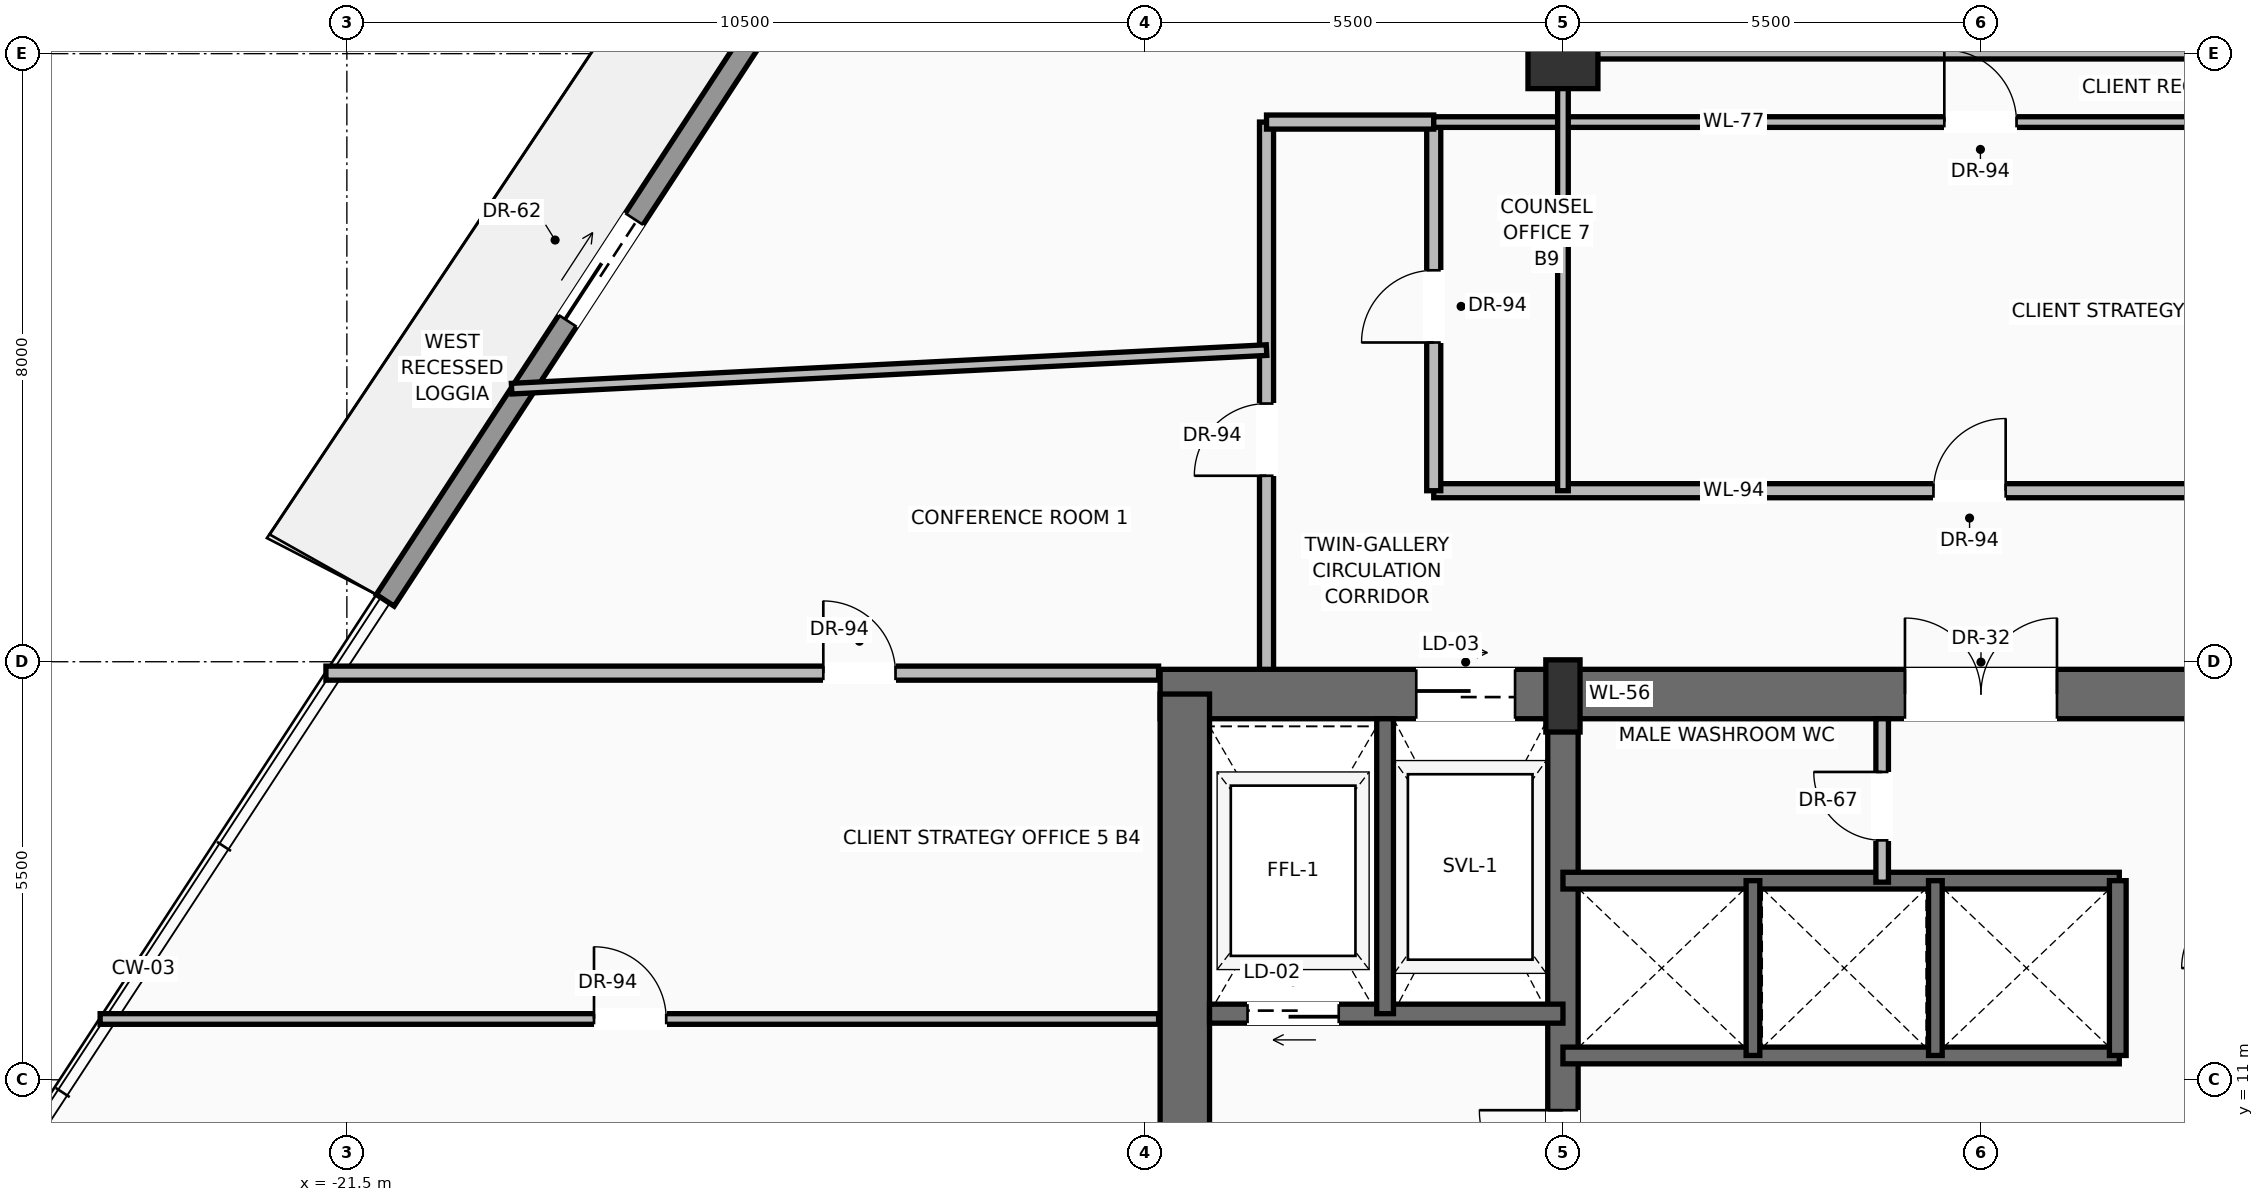
"""IFC4 building model, lengths in metres.
Left out: names, types, materials, properties, quantities, classifications, styles, units other than length and angle.
Written with IfcOpenShell. Run it as: python <this file> out.ifc"""

import sys

from ifc_helpers import new_model, si_unit, direction, frame, frame_2d, origin, origin_2d, place, context, subcontext, project, spatial, rectangle, extrude, source, transform, mapped, element, fill, save


model = new_model("IFC4")
c1 = context("Model", 3, precision=1e-05, world=origin(), true_north=direction((0.0, 1.0)))
c2 = subcontext(c1, "Body", "Model", "MODEL_VIEW")
j1 = project(units=[si_unit("LENGTHUNIT", "METRE"), si_unit("PLANEANGLEUNIT", "RADIAN")], contexts=[c1])
p1 = place(None, origin())
s1 = spatial("IfcSite", under=j1, at=p1, CompositionType="ELEMENT")
p2 = place(p1, origin())
s2 = spatial("IfcBuilding", under=s1, at=p2, CompositionType="ELEMENT")
p3 = place(p2, frame((0.0, 0.0, 136.7)))
s3 = spatial("IfcBuildingStorey", under=s2, at=p3, CompositionType="ELEMENT", Elevation=136.7)
p4 = place(p3, frame((-10.8, 16.075, 0.0), z_axis=(0.0, 0.0, 1.0), x_axis=(1.0, 0.0, 0.0)))
e1 = element("IfcWall", 1, at=p4, inside=s3, PredefinedType="SHEAR", context=c2, shape_type="SweptSolid", body=[
    extrude(rectangle(XDim=21.6, YDim=0.65, at=frame_2d((10.8, 0.0))), origin(), (0.0, 0.0, 1.0), 3.47),
])
p5 = place(p4, frame((3.37, 0.0, 0.0)))
e2 = element("IfcOpeningElement", 2, at=p5, cuts=e1, PredefinedType="OPENING", context=c2, shape_type="SweptSolid", body=[
    extrude(rectangle(XDim=1.3, YDim=2.3, at=frame_2d((0.65, 1.15))), frame((0.0, 0.335, 0.0), z_axis=(0.0, -1.0, 0.0), x_axis=(1.0, 0.0, 0.0)), (0.0, 0.0, 1.0), 0.67),
])
p6 = place(p4, frame((9.8, 0.0, 0.0)))
e3 = element("IfcOpeningElement", 3, at=p6, cuts=e1, PredefinedType="OPENING", context=c2, shape_type="SweptSolid", body=[
    extrude(rectangle(XDim=2.0, YDim=2.4, at=frame_2d((1.0, 1.2))), frame((0.0, 0.335, 0.0), z_axis=(0.0, -1.0, 0.0), x_axis=(1.0, 0.0, 0.0)), (0.0, 0.0, 1.0), 0.67),
])
p7 = place(p3, frame((-10.475, 0.525, 0.0), z_axis=(0.0, 0.0, 1.0), x_axis=(0.0, 1.0, 0.0)))
e4 = element("IfcWall", 4, at=p7, inside=s3, PredefinedType="SHEAR", context=c2, shape_type="SweptSolid", body=[
    extrude(rectangle(XDim=15.55, YDim=0.65, at=frame_2d((7.775, 0.0))), origin(), (0.0, 0.0, 1.0), 3.47),
])
p8 = place(p3, frame((-5.5, 0.525, 0.0), z_axis=(0.0, 0.0, 1.0), x_axis=(0.0, 1.0, 0.0)))
e5 = element("IfcWall", 5, at=p8, inside=s3, PredefinedType="SHEAR", context=c2, shape_type="SweptSolid", body=[
    extrude(rectangle(XDim=15.55, YDim=0.4, at=frame_2d((7.775, 0.0))), origin(), (0.0, 0.0, 1.0), 3.47),
])
p9 = place(p8, frame((8.975, 0.0, 0.0)))
e6 = element("IfcOpeningElement", 6, at=p9, cuts=e5, PredefinedType="OPENING", context=c2, shape_type="SweptSolid", body=[
    extrude(rectangle(XDim=1.1, YDim=2.2, at=frame_2d((0.55, 1.1))), frame((0.0, 0.21, 0.0), z_axis=(0.0, -1.0, 0.0), x_axis=(1.0, 0.0, 0.0)), (0.0, 0.0, 1.0), 0.42),
])
m1 = source(origin(), c2, "Body", "SweptSolid", [
    extrude(rectangle(XDim=0.45, YDim=0.95, at=origin_2d()), origin(), (0.0, 0.0, 1.0), 3.7),
])
p10 = place(p3, frame((-5.5, 16.05, 0.0), z_axis=(0.0, 0.0, 1.0), x_axis=(1.0, 0.0, 0.0)))
e7 = element("IfcColumn", 7, at=p10, inside=s3, PredefinedType="PILASTER", context=c2, shape_type="MappedRepresentation", body=[
    mapped(m1, transform((0.0, 0.0, 0.0), scale=1.0)),
])
m2 = source(origin(), c2, "Body", "SweptSolid", [
    extrude(rectangle(XDim=0.92, YDim=0.92, at=origin_2d()), origin(), (0.0, 0.0, 1.0), 3.7),
])
p11 = place(p3, frame((-5.5, 24.5, 0.0), z_axis=(0.0, 0.0, 1.0), x_axis=(1.0, 0.0, 0.0)))
e8 = element("IfcColumn", 8, at=p11, inside=s3, PredefinedType="COLUMN", context=c2, shape_type="MappedRepresentation", body=[
    mapped(m2, transform((0.0, 0.0, 0.0), scale=1.0)),
])
p12 = place(p3, frame((-20.995, 17.308, 0.0), z_axis=(0.0, 0.0, 1.0), x_axis=(0.546683321298, 0.837339445037, 0.0)))
e9 = element("IfcWall", 9, at=p12, inside=s3, PredefinedType="SOLIDWALL", context=c2, shape_type="SweptSolid", body=[
    extrude(rectangle(XDim=18.295, YDim=0.28, at=frame_2d((9.147, 0.0))), origin(), (0.0, 0.0, 1.0), 3.05),
])
p13 = place(p12, frame((4.391, 0.0, 0.0)))
e10 = element("IfcOpeningElement", 10, at=p13, cuts=e9, PredefinedType="OPENING", context=c2, shape_type="SweptSolid", body=[
    extrude(rectangle(XDim=1.6, YDim=2.35, at=frame_2d((0.8, 1.175))), frame((0.0, 0.15, 0.0), z_axis=(0.0, -1.0, 0.0), x_axis=(1.0, 0.0, 0.0)), (0.0, 0.0, 1.0), 0.3),
])
p14 = place(p12, frame((12.441, 0.0, 0.9)))
e11 = element("IfcOpeningElement", 11, at=p14, cuts=e9, PredefinedType="OPENING", context=c2, shape_type="SweptSolid", body=[
    extrude(rectangle(XDim=2.0, YDim=1.85, at=frame_2d((1.0, 0.925))), frame((0.0, 0.15, 0.0), z_axis=(0.0, -1.0, 0.0), x_axis=(1.0, 0.0, 0.0)), (0.0, 0.0, 1.0), 0.3),
])
p15 = place(p3, frame((-5.5, 11.87, 0.0), z_axis=(0.0, 0.0, 1.0), x_axis=(-1.0, 0.0, 0.0)))
e12 = element("IfcWall", 12, at=p15, inside=s3, PredefinedType="SOLIDWALL", context=c2, shape_type="SweptSolid", body=[
    extrude(rectangle(XDim=4.65, YDim=0.25, at=frame_2d((2.325, 0.0))), origin(), (0.0, 0.0, 1.0), 3.47),
])
p16 = place(p15, frame((2.95, 0.0, 0.0)))
e13 = element("IfcOpeningElement", 13, at=p16, cuts=e12, PredefinedType="OPENING", context=c2, shape_type="SweptSolid", body=[
    extrude(rectangle(XDim=1.2, YDim=2.25, at=frame_2d((0.6, 1.125))), frame((0.0, 0.135, 0.0), z_axis=(0.0, -1.0, 0.0), x_axis=(1.0, 0.0, 0.0)), (0.0, 0.0, 1.0), 0.27),
])
p17 = place(p3, frame((-7.84, 11.87, 0.0), z_axis=(0.0, 0.0, 1.0), x_axis=(0.0, 1.0, 0.0)))
e14 = element("IfcWall", 14, at=p17, inside=s3, PredefinedType="SOLIDWALL", context=c2, shape_type="SweptSolid", body=[
    extrude(rectangle(XDim=3.88, YDim=0.22, at=frame_2d((1.94, 0.0))), origin(), (0.0, 0.0, 1.0), 3.47),
])
for number, where, z_axis, x_axis in (
    (15, (-5.5, 11.32, 0.0), (0.0, 0.0, 1.0), (1.0, 0.0, 0.0)),
    (16, (-5.5, 13.62, 0.0), (0.0, 0.0, 1.0), (1.0, 0.0, 0.0)),
):
    element("IfcWall", number, at=place(p3, frame(where, z_axis=z_axis, x_axis=x_axis)), inside=s3, PredefinedType="SOLIDWALL", context=c2, shape_type="SweptSolid", body=[
        extrude(rectangle(XDim=7.32, YDim=0.22, at=frame_2d((3.66, 0.0))), origin(), (0.0, 0.0, 1.0), 3.47),
    ])
p18 = place(p3, frame((1.8, 11.32, 0.0), z_axis=(0.0, 0.0, 1.0), x_axis=(0.0, 1.0, 0.0)))
e17 = element("IfcWall", 17, at=p18, inside=s3, PredefinedType="SOLIDWALL", context=c2, shape_type="SweptSolid", body=[
    extrude(rectangle(XDim=2.3, YDim=0.22, at=frame_2d((1.15, 0.0))), origin(), (0.0, 0.0, 1.0), 3.47),
])
for number, where, z_axis, x_axis in (
    (18, (-3.0, 11.32, 0.0), (0.0, 0.0, 1.0), (0.0, 1.0, 0.0)),
    (19, (-0.6, 11.32, 0.0), (0.0, 0.0, 1.0), (0.0, 1.0, 0.0)),
):
    element("IfcWall", number, at=place(p3, frame(where, z_axis=z_axis, x_axis=x_axis)), inside=s3, PredefinedType="SOLIDWALL", context=c2, shape_type="SweptSolid", body=[
        extrude(rectangle(XDim=2.3, YDim=0.18, at=frame_2d((1.15, 0.0))), origin(), (0.0, 0.0, 1.0), 3.47),
    ])
p19 = place(p3, frame((-1.3, 13.6, 0.0), z_axis=(0.0, 0.0, 1.0), x_axis=(0.0, 1.0, 0.0)))
e20 = element("IfcWall", 20, at=p19, inside=s3, PredefinedType="PARTITIONING", context=c2, shape_type="SweptSolid", body=[
    extrude(rectangle(XDim=2.15, YDim=0.165, at=frame_2d((1.075, 0.0))), origin(), (0.0, 0.0, 1.0), 3.462),
])
p20 = place(p19, frame((0.55, 0.0, 0.0)))
e21 = element("IfcOpeningElement", 21, at=p20, cuts=e20, PredefinedType="OPENING", context=c2, shape_type="SweptSolid", body=[
    extrude(rectangle(XDim=0.9, YDim=2.1, at=frame_2d((0.45, 1.05))), frame((0.0, 0.093, 0.0), z_axis=(0.0, -1.0, 0.0), x_axis=(1.0, 0.0, 0.0)), (0.0, 0.0, 1.0), 0.185),
])
p21 = place(p3, frame((-7.2, 18.75, 0.0), z_axis=(0.0, 0.0, 1.0), x_axis=(1.0, 0.0, 0.0)))
e22 = element("IfcWall", 22, at=p21, inside=s3, PredefinedType="PARTITIONING", context=c2, shape_type="SweptSolid", body=[
    extrude(rectangle(XDim=14.1, YDim=0.185, at=frame_2d((7.05, 0.0))), origin(), (0.0, 0.0, 1.0), 2.846),
])
p22 = place(p21, frame((6.575, 0.0, 0.0)))
e23 = element("IfcOpeningElement", 23, at=p22, cuts=e22, PredefinedType="OPENING", context=c2, shape_type="SweptSolid", body=[
    extrude(rectangle(XDim=0.95, YDim=2.2, at=frame_2d((0.475, 1.1))), frame((0.0, 0.103, 0.0), z_axis=(0.0, -1.0, 0.0), x_axis=(1.0, 0.0, 0.0)), (0.0, 0.0, 1.0), 0.205),
])
p23 = place(p3, frame((-7.2, 18.75, 0.0), z_axis=(0.0, 0.0, 1.0), x_axis=(0.0, 1.0, 0.0)))
e24 = element("IfcWall", 24, at=p23, inside=s3, PredefinedType="PARTITIONING", context=c2, shape_type="SweptSolid", body=[
    extrude(rectangle(XDim=4.85, YDim=0.185, at=frame_2d((2.425, 0.0))), origin(), (0.0, 0.0, 1.0), 3.462),
])
p24 = place(p23, frame((1.95, 0.0, 0.0)))
e25 = element("IfcOpeningElement", 25, at=p24, cuts=e24, PredefinedType="OPENING", context=c2, shape_type="SweptSolid", body=[
    extrude(rectangle(XDim=0.95, YDim=2.2, at=frame_2d((0.475, 1.1))), frame((0.0, 0.103, 0.0), z_axis=(0.0, -1.0, 0.0), x_axis=(1.0, 0.0, 0.0)), (0.0, 0.0, 1.0), 0.205),
])
p25 = place(p3, frame((-9.4, 16.4, 0.0), z_axis=(0.0, 0.0, 1.0), x_axis=(0.0, 1.0, 0.0)))
e26 = element("IfcWall", 26, at=p25, inside=s3, PredefinedType="PARTITIONING", context=c2, shape_type="SweptSolid", body=[
    extrude(rectangle(XDim=7.2, YDim=0.185, at=frame_2d((3.6, 0.0))), origin(), (0.0, 0.0, 1.0), 3.462),
])
p26 = place(p25, frame((2.547, 0.0, 0.0)))
e27 = element("IfcOpeningElement", 27, at=p26, cuts=e26, PredefinedType="OPENING", context=c2, shape_type="SweptSolid", body=[
    extrude(rectangle(XDim=0.95, YDim=2.2, at=frame_2d((0.475, 1.1))), frame((0.0, 0.103, 0.0), z_axis=(0.0, -1.0, 0.0), x_axis=(1.0, 0.0, 0.0)), (0.0, 0.0, 1.0), 0.205),
])
p27 = place(p3, frame((-9.4, 23.6, 0.0), z_axis=(0.0, 0.0, 1.0), x_axis=(1.0, 0.0, 0.0)))
e28 = element("IfcWall", 28, at=p27, inside=s3, PredefinedType="PARTITIONING", context=c2, shape_type="SweptSolid", body=[
    extrude(rectangle(XDim=2.2, YDim=0.185, at=frame_2d((1.1, 0.0))), origin(), (0.0, 0.0, 1.0), 3.462),
])
p28 = place(p3, frame((-21.776, 16.35, 0.0), z_axis=(0.0, 0.0, 1.0), x_axis=(1.0, 0.0, 0.0)))
e29 = element("IfcWall", 29, at=p28, inside=s3, PredefinedType="PARTITIONING", context=c2, shape_type="SweptSolid", body=[
    extrude(rectangle(XDim=10.956, YDim=0.185, at=frame_2d((5.478, 0.0))), origin(), (0.0, 0.0, 1.0), 3.462),
])
p29 = place(p28, frame((6.544, 0.0, 0.0)))
e30 = element("IfcOpeningElement", 30, at=p29, cuts=e29, PredefinedType="OPENING", context=c2, shape_type="SweptSolid", body=[
    extrude(rectangle(XDim=0.95, YDim=2.2, at=frame_2d((0.475, 1.1))), frame((0.0, 0.103, 0.0), z_axis=(0.0, -1.0, 0.0), x_axis=(1.0, 0.0, 0.0)), (0.0, 0.0, 1.0), 0.205),
])
p30 = place(p3, frame((-7.2, 23.6, 0.0), z_axis=(0.0, 0.0, 1.0), x_axis=(1.0, 0.0, 0.0)))
e31 = element("IfcWall", 31, at=p30, inside=s3, PredefinedType="PARTITIONING", context=c2, shape_type="SweptSolid", body=[
    extrude(rectangle(XDim=14.1, YDim=0.14, at=frame_2d((7.05, 0.0))), origin(), (0.0, 0.0, 1.0), 3.462),
])
p31 = place(p30, frame((6.718, 0.0, 0.0)))
e32 = element("IfcOpeningElement", 32, at=p31, cuts=e31, PredefinedType="OPENING", context=c2, shape_type="SweptSolid", body=[
    extrude(rectangle(XDim=0.95, YDim=2.2, at=frame_2d((0.475, 1.1))), frame((0.0, 0.08, 0.0), z_axis=(0.0, -1.0, 0.0), x_axis=(1.0, 0.0, 0.0)), (0.0, 0.0, 1.0), 0.16),
])
p32 = place(p3, frame((-5.5, 18.75, 0.0), z_axis=(0.0, 0.0, 1.0), x_axis=(0.0, 1.0, 0.0)))
e33 = element("IfcWall", 33, at=p32, inside=s3, PredefinedType="PARTITIONING", context=c2, shape_type="SweptSolid", body=[
    extrude(rectangle(XDim=13.75, YDim=0.14, at=frame_2d((6.875, 0.0))), origin(), (0.0, 0.0, 1.0), 2.846),
])
p33 = place(p3, frame((-5.5, 24.5, 0.0), z_axis=(0.0, 0.0, 1.0), x_axis=(1.0, 0.0, 0.0)))
e34 = element("IfcWall", 34, at=p33, inside=s3, PredefinedType="PARTITIONING", context=c2, shape_type="SweptSolid", body=[
    extrude(rectangle(XDim=11.0, YDim=0.14, at=frame_2d((5.5, 0.0))), origin(), (0.0, 0.0, 1.0), 2.846),
])
p34 = place(p3, frame((-24.746, 11.8, 0.0), z_axis=(0.0, 0.0, 1.0), x_axis=(1.0, 0.0, 0.0)))
e35 = element("IfcWall", 35, at=p34, inside=s3, PredefinedType="PARTITIONING", context=c2, shape_type="SweptSolid", body=[
    extrude(rectangle(XDim=13.926, YDim=0.14, at=frame_2d((6.963, 0.0))), origin(), (0.0, 0.0, 1.0), 3.462),
])
p35 = place(p34, frame((6.498, 0.0, 0.0)))
e36 = element("IfcOpeningElement", 36, at=p35, cuts=e35, PredefinedType="OPENING", context=c2, shape_type="SweptSolid", body=[
    extrude(rectangle(XDim=0.95, YDim=2.2, at=frame_2d((0.475, 1.1))), frame((0.0, 0.08, 0.0), z_axis=(0.0, -1.0, 0.0), x_axis=(1.0, 0.0, 0.0)), (0.0, 0.0, 1.0), 0.16),
])
p36 = place(p3, frame((-19.332, 20.092, 0.0), z_axis=(0.0, 0.0, 1.0), x_axis=(0.998695571357, 0.051060314835, 0.0)))
e37 = element("IfcWall", 37, at=p36, inside=s3, PredefinedType="PARTITIONING", context=c2, shape_type="SweptSolid", body=[
    extrude(rectangle(XDim=9.945, YDim=0.14, at=frame_2d((4.973, 0.0))), origin(), (0.0, 0.0, 1.0), 3.462),
])
m3 = source(origin(), c2, "Body", "SweptSolid", [
    extrude(rectangle(XDim=1.6, YDim=2.35, at=frame_2d((0.8, 1.175))), frame((0.0, 0.025, 0.0), z_axis=(0.0, -1.0, 0.0), x_axis=(1.0, 0.0, 0.0)), (0.0, 0.0, 1.0), 0.05),
])
p37 = place(p13, origin())
e38 = element("IfcDoor", 38, at=p37, inside=s3, OperationType="SLIDING_TO_LEFT", PredefinedType="DOOR", context=c2, shape_type="MappedRepresentation", body=[
    mapped(m3, transform((0.0, 0.0, 0.0), scale=1.0)),
])
fill(e10, e38)
m4 = source(origin(), c2, "Body", "SweptSolid", [
    extrude(rectangle(XDim=1.1, YDim=2.2, at=frame_2d((0.55, 1.1))), frame((0.0, 0.025, 0.0), z_axis=(0.0, -1.0, 0.0), x_axis=(1.0, 0.0, 0.0)), (0.0, 0.0, 1.0), 0.05),
])
p38 = place(p9, origin())
e39 = element("IfcDoor", 39, at=p38, inside=s3, OperationType="SINGLE_SWING_RIGHT", PredefinedType="DOOR", context=c2, shape_type="MappedRepresentation", body=[
    mapped(m4, transform((0.0, 0.0, 0.0), scale=1.0)),
])
fill(e6, e39)
m5 = source(origin(), c2, "Body", "SweptSolid", [
    extrude(rectangle(XDim=1.2, YDim=2.25, at=frame_2d((0.6, 1.125))), frame((0.0, 0.025, 0.0), z_axis=(0.0, -1.0, 0.0), x_axis=(1.0, 0.0, 0.0)), (0.0, 0.0, 1.0), 0.05),
])
p39 = place(p16, origin())
e40 = element("IfcDoor", 40, at=p39, inside=s3, OperationType="SLIDING_TO_LEFT", PredefinedType="DOOR", context=c2, shape_type="MappedRepresentation", body=[
    mapped(m5, transform((0.0, 0.0, 0.0), scale=1.0)),
])
fill(e13, e40)
m6 = source(origin(), c2, "Body", "SweptSolid", [
    extrude(rectangle(XDim=1.3, YDim=2.3, at=frame_2d((0.65, 1.15))), frame((0.0, 0.025, 0.0), z_axis=(0.0, -1.0, 0.0), x_axis=(1.0, 0.0, 0.0)), (0.0, 0.0, 1.0), 0.05),
])
p40 = place(p5, origin())
e41 = element("IfcDoor", 41, at=p40, inside=s3, OperationType="SLIDING_TO_RIGHT", PredefinedType="DOOR", context=c2, shape_type="MappedRepresentation", body=[
    mapped(m6, transform((0.0, 0.0, 0.0), scale=1.0)),
])
fill(e2, e41)
m7 = source(origin(), c2, "Body", "SweptSolid", [
    extrude(rectangle(XDim=2.0, YDim=2.4, at=frame_2d((1.0, 1.2))), frame((0.0, 0.025, 0.0), z_axis=(0.0, -1.0, 0.0), x_axis=(1.0, 0.0, 0.0)), (0.0, 0.0, 1.0), 0.05),
])
p41 = place(p6, origin())
e42 = element("IfcDoor", 42, at=p41, inside=s3, OperationType="DOUBLE_DOOR_SINGLE_SWING", PredefinedType="DOOR", context=c2, shape_type="MappedRepresentation", body=[
    mapped(m7, transform((0.0, 0.0, 0.0), scale=1.0)),
])
fill(e3, e42)
m8 = source(origin(), c2, "Body", "SweptSolid", [
    extrude(rectangle(XDim=0.9, YDim=2.1, at=frame_2d((0.45, 1.05))), frame((0.0, 0.025, 0.0), z_axis=(0.0, -1.0, 0.0), x_axis=(1.0, 0.0, 0.0)), (0.0, 0.0, 1.0), 0.05),
])
p42 = place(p20, origin())
e43 = element("IfcDoor", 43, at=p42, inside=s3, OperationType="SINGLE_SWING_RIGHT", PredefinedType="DOOR", context=c2, shape_type="MappedRepresentation", body=[
    mapped(m8, transform((0.0, 0.0, 0.0), scale=1.0)),
])
fill(e21, e43)
m9 = source(origin(), c2, "Body", "SweptSolid", [
    extrude(rectangle(XDim=0.95, YDim=2.2, at=frame_2d((0.475, 1.1))), frame((0.0, 0.025, 0.0), z_axis=(0.0, -1.0, 0.0), x_axis=(1.0, 0.0, 0.0)), (0.0, 0.0, 1.0), 0.05),
])
p43 = place(p22, origin())
e44 = element("IfcDoor", 44, at=p43, inside=s3, OperationType="SINGLE_SWING_RIGHT", PredefinedType="DOOR", context=c2, shape_type="MappedRepresentation", body=[
    mapped(m9, transform((0.0, 0.0, 0.0), scale=1.0)),
])
fill(e23, e44)
p44 = place(p26, origin())
e45 = element("IfcDoor", 45, at=p44, inside=s3, OperationType="SINGLE_SWING_LEFT", PredefinedType="DOOR", context=c2, shape_type="MappedRepresentation", body=[
    mapped(m9, transform((0.0, 0.0, 0.0), scale=1.0)),
])
fill(e27, e45)
p45 = place(p29, origin())
e46 = element("IfcDoor", 46, at=p45, inside=s3, OperationType="SINGLE_SWING_LEFT", PredefinedType="DOOR", context=c2, shape_type="MappedRepresentation", body=[
    mapped(m9, transform((0.0, 0.0, 0.0), scale=1.0)),
])
fill(e30, e46)
p46 = place(p35, origin())
e47 = element("IfcDoor", 47, at=p46, inside=s3, OperationType="SINGLE_SWING_LEFT", PredefinedType="DOOR", context=c2, shape_type="MappedRepresentation", body=[
    mapped(m9, transform((0.0, 0.0, 0.0), scale=1.0)),
])
fill(e36, e47)
p47 = place(p24, origin())
e48 = element("IfcDoor", 48, at=p47, inside=s3, OperationType="SINGLE_SWING_LEFT", PredefinedType="DOOR", context=c2, shape_type="MappedRepresentation", body=[
    mapped(m9, transform((0.0, 0.0, 0.0), scale=1.0)),
])
fill(e25, e48)
p48 = place(p31, origin())
e49 = element("IfcDoor", 49, at=p48, inside=s3, OperationType="SINGLE_SWING_LEFT", PredefinedType="DOOR", context=c2, shape_type="MappedRepresentation", body=[
    mapped(m9, transform((0.0, 0.0, 0.0), scale=1.0)),
])
fill(e32, e49)
save(model, sys.argv[1])
